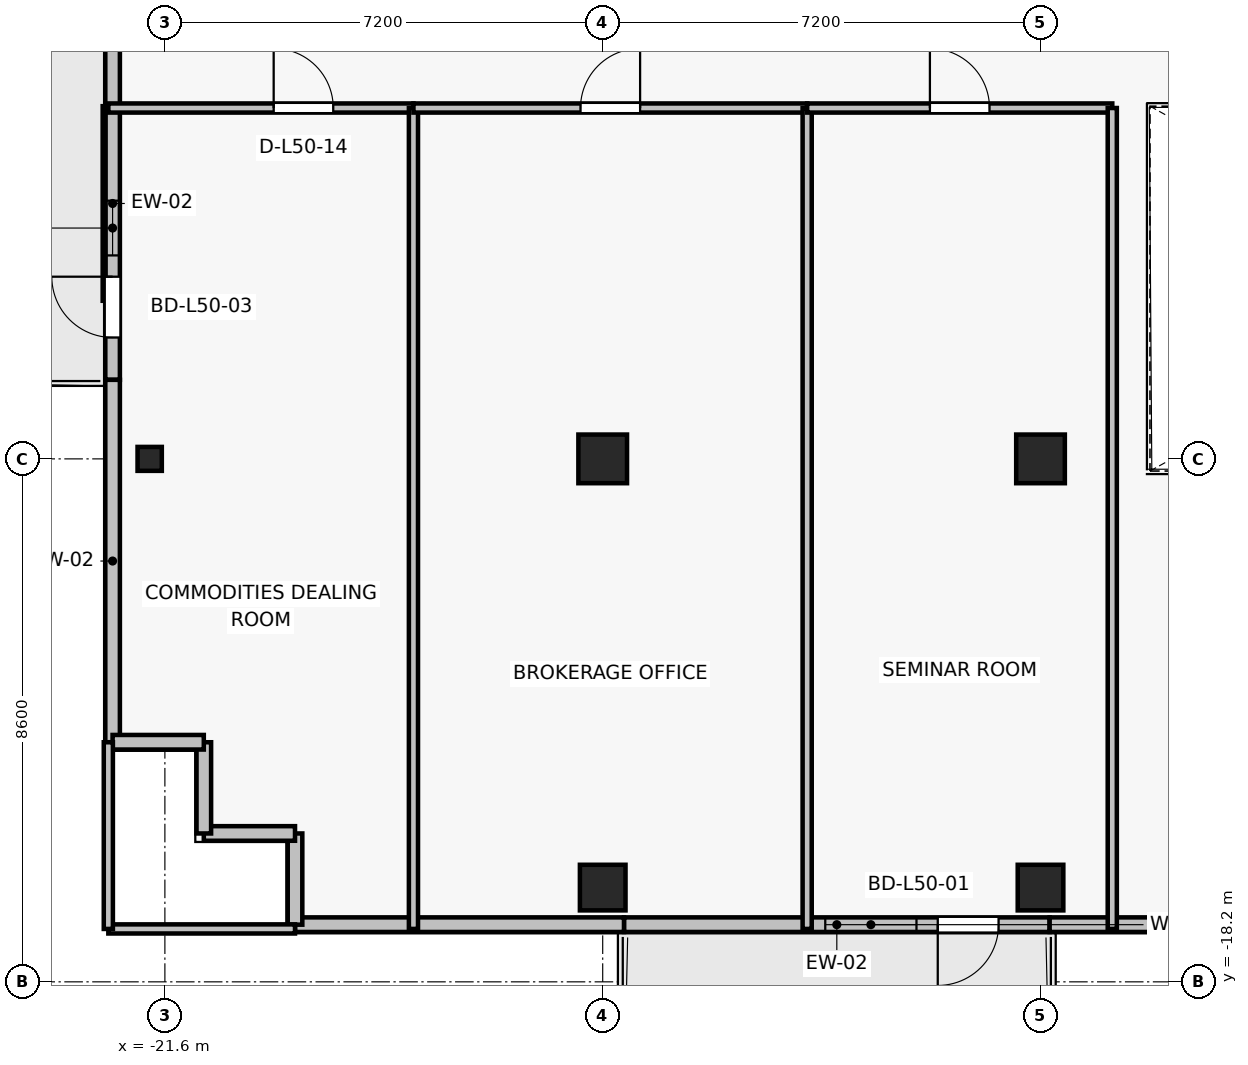
"""IFC4 building model, lengths in metres.
Left out: names, types, materials, properties, quantities, classifications, styles, units other than length and angle.
Written with IfcOpenShell. Run it as: python <this file> out.ifc"""

import sys

from ifc_helpers import new_model, si_unit, direction, frame, frame_2d, origin, origin_2d, place, context, subcontext, project, spatial, rectangle, i_section, extrude, source, transform, mapped, element, fill, save


model = new_model("IFC4")
c1 = context("Model", 3, precision=1e-05, world=origin(), true_north=direction((0.0, 1.0)))
c2 = subcontext(c1, "Body", "Model", "MODEL_VIEW")
j1 = project(units=[si_unit("LENGTHUNIT", "METRE"), si_unit("PLANEANGLEUNIT", "RADIAN")], contexts=[c1])
p1 = place(None, origin())
s1 = spatial("IfcSite", under=j1, at=p1, CompositionType="ELEMENT")
p2 = place(p1, origin())
s2 = spatial("IfcBuilding", under=s1, at=p2, CompositionType="ELEMENT")
p3 = place(p2, frame((0.0, 0.0, 179.2)))
s3 = spatial("IfcBuildingStorey", under=s2, at=p3, CompositionType="ELEMENT", Elevation=179.2)
for number, where, z_axis, x_axis in (
    (1, (-14.4, -9.6, 0.0), (0.0, 0.0, 1.0), (1.0, 0.0, 0.0)),
    (2, (-7.2, -9.6, 0.0), (0.0, 0.0, 1.0), (1.0, 0.0, 0.0)),
):
    element("IfcColumn", number, at=place(p3, frame(where, z_axis=z_axis, x_axis=x_axis)), inside=s3, PredefinedType="COLUMN", context=c2, shape_type="SweptSolid", body=[
        extrude(rectangle(XDim=0.8, YDim=0.8, at=origin_2d()), origin(), (0.0, 0.0, 1.0), 3.3),
    ])
for number, where, z_axis, x_axis in (
    (3, (-14.4, -16.65, 0.0), (0.0, 0.0, 1.0), (1.0, 0.0, 0.0)),
    (4, (-7.2, -16.65, 0.0), (0.0, 0.0, 1.0), (1.0, 0.0, 0.0)),
):
    element("IfcColumn", number, at=place(p3, frame(where, z_axis=z_axis, x_axis=x_axis)), inside=s3, PredefinedType="COLUMN", context=c2, shape_type="SweptSolid", body=[
        extrude(rectangle(XDim=0.75, YDim=0.75, at=origin_2d()), origin(), (0.0, 0.0, 1.0), 3.3),
    ])
p4 = place(p3, frame((-21.85, -9.6, 0.0), z_axis=(0.0, 0.0, 1.0), x_axis=(1.0, 0.0, 0.0)))
e5 = element("IfcColumn", 5, at=p4, inside=s3, PredefinedType="COLUMN", context=c2, shape_type="SweptSolid", body=[
    extrude(i_section(OverallWidth=0.399, OverallDepth=0.394, WebThickness=0.023, FlangeThickness=0.037, FilletRadius=0.015, at=origin_2d()), origin(), (0.0, 0.0, 1.0), 3.3),
])
p5 = place(p3, frame((-7.05, -17.26, 0.0), z_axis=(0.0, 0.0, 1.0), x_axis=(-1.0, 0.0, 0.0)))
e6 = element("IfcWall", 6, at=p5, inside=s3, PredefinedType="SOLIDWALL", context=c2, shape_type="SweptSolid", body=[
    extrude(rectangle(XDim=7.0, YDim=0.24, at=frame_2d((3.5, 0.0))), origin(), (0.0, 0.0, 1.0), 2.665),
])
p6 = place(p5, frame((0.84, 0.0, 0.0)))
e7 = element("IfcOpeningElement", 7, at=p6, cuts=e6, PredefinedType="OPENING", context=c2, shape_type="SweptSolid", body=[
    extrude(rectangle(XDim=1.0, YDim=2.2, at=frame_2d((0.5, 1.1))), frame((0.0, 0.13, 0.0), z_axis=(0.0, -1.0, 0.0), x_axis=(1.0, 0.0, 0.0)), (0.0, 0.0, 1.0), 0.26),
])
p7 = place(p5, frame((2.19, 0.0, 0.85)))
e8 = element("IfcOpeningElement", 8, at=p7, cuts=e6, PredefinedType="OPENING", context=c2, shape_type="SweptSolid", body=[
    extrude(rectangle(XDim=1.5, YDim=1.6, at=frame_2d((0.75, 0.8))), frame((0.0, 0.13, 0.0), z_axis=(0.0, -1.0, 0.0), x_axis=(1.0, 0.0, 0.0)), (0.0, 0.0, 1.0), 0.26),
])
p8 = place(p3, frame((-22.46, -8.3, 0.0), z_axis=(0.0, 0.0, 1.0), x_axis=(0.0, 1.0, 0.0)))
e9 = element("IfcWall", 9, at=p8, inside=s3, PredefinedType="SOLIDWALL", context=c2, shape_type="SweptSolid", body=[
    extrude(rectangle(XDim=5.8, YDim=0.24, at=frame_2d((2.9, 0.0))), origin(), (0.0, 0.0, 1.0), 3.075),
])
p9 = place(p8, frame((0.696, 0.0, 0.0)))
e10 = element("IfcOpeningElement", 10, at=p9, cuts=e9, PredefinedType="OPENING", context=c2, shape_type="SweptSolid", body=[
    extrude(rectangle(XDim=1.0, YDim=2.2, at=frame_2d((0.5, 1.1))), frame((0.0, 0.13, 0.0), z_axis=(0.0, -1.0, 0.0), x_axis=(1.0, 0.0, 0.0)), (0.0, 0.0, 1.0), 0.26),
])
p10 = place(p8, frame((2.046, 0.0, 0.85)))
e11 = element("IfcOpeningElement", 11, at=p10, cuts=e9, PredefinedType="OPENING", context=c2, shape_type="SweptSolid", body=[
    extrude(rectangle(XDim=0.9, YDim=1.35, at=frame_2d((0.45, 0.675))), frame((0.0, 0.13, 0.0), z_axis=(0.0, -1.0, 0.0), x_axis=(1.0, 0.0, 0.0)), (0.0, 0.0, 1.0), 0.26),
])
p11 = place(p3, frame((-22.46, -8.3, 0.0), z_axis=(0.0, 0.0, 1.0), x_axis=(0.0, -1.0, 0.0)))
e12 = element("IfcWall", 12, at=p11, inside=s3, PredefinedType="SOLIDWALL", context=c2, shape_type="SweptSolid", body=[
    extrude(rectangle(XDim=5.96, YDim=0.24, at=frame_2d((2.98, 0.0))), origin(), (0.0, 0.0, 1.0), 3.075),
])
p12 = place(p3, frame((-7.05, -17.26, 0.0), z_axis=(0.0, 0.0, 1.0), x_axis=(1.0, 0.0, 0.0)))
e13 = element("IfcWall", 13, at=p12, inside=s3, PredefinedType="SOLIDWALL", context=c2, shape_type="SweptSolid", body=[
    extrude(rectangle(XDim=3.85, YDim=0.24, at=frame_2d((1.925, 0.0))), origin(), (0.0, 0.0, 1.0), 3.075),
])
p13 = place(p3, frame((-19.46, -17.26, 0.0), z_axis=(0.0, 0.0, 1.0), x_axis=(1.0, 0.0, 0.0)))
e14 = element("IfcWall", 14, at=p13, inside=s3, PredefinedType="SOLIDWALL", context=c2, shape_type="SweptSolid", body=[
    extrude(rectangle(XDim=5.41, YDim=0.24, at=frame_2d((2.705, 0.0))), origin(), (0.0, 0.0, 1.0), 3.075),
])
for number, where, z_axis, x_axis in (
    (15, (-19.46, -15.76, 0.0), (0.0, 0.0, 1.0), (0.0, -1.0, 0.0)),
    (16, (-20.96, -15.76, 0.0), (0.0, 0.0, 1.0), (1.0, 0.0, 0.0)),
    (17, (-20.96, -14.26, 0.0), (0.0, 0.0, 1.0), (0.0, -1.0, 0.0)),
    (18, (-22.46, -14.26, 0.0), (0.0, 0.0, 1.0), (1.0, 0.0, 0.0)),
):
    element("IfcWall", number, at=place(p3, frame(where, z_axis=z_axis, x_axis=x_axis)), inside=s3, PredefinedType="SOLIDWALL", context=c2, shape_type="SweptSolid", body=[
        extrude(rectangle(XDim=1.5, YDim=0.24, at=frame_2d((0.75, 0.0))), origin(), (0.0, 0.0, 1.0), 3.075),
    ])
p14 = place(p3, frame((-19.46, -17.33, 0.0), z_axis=(0.0, 0.0, 1.0), x_axis=(-1.0, 0.0, 0.0)))
e19 = element("IfcWall", 19, at=p14, inside=s3, PredefinedType="PARTITIONING", context=c2, shape_type="SweptSolid", body=[
    extrude(rectangle(XDim=3.07, YDim=0.15, at=frame_2d((1.535, 0.0))), origin(), (0.0, 0.0, 1.0), 3.075),
])
p15 = place(p3, frame((-22.53, -3.83, 0.0), z_axis=(0.0, 0.0, 1.0), x_axis=(1.0, 0.0, 0.0)))
e20 = element("IfcWall", 20, at=p15, inside=s3, PredefinedType="PARTITIONING", context=c2, shape_type="SweptSolid", body=[
    extrude(rectangle(XDim=5.018, YDim=0.15, at=frame_2d((2.509, 0.0))), origin(), (0.0, 0.0, 1.0), 2.565),
])
p16 = place(p15, frame((2.719, 0.0, 0.0)))
e21 = element("IfcOpeningElement", 21, at=p16, cuts=e20, PredefinedType="OPENING", context=c2, shape_type="SweptSolid", body=[
    extrude(rectangle(XDim=0.98, YDim=2.15, at=frame_2d((0.49, 1.075))), frame((0.0, 0.085, 0.0), z_axis=(0.0, -1.0, 0.0), x_axis=(1.0, 0.0, 0.0)), (0.0, 0.0, 1.0), 0.17),
])
p17 = place(p3, frame((-22.53, -17.33, 0.0), z_axis=(0.0, 0.0, 1.0), x_axis=(0.0, 1.0, 0.0)))
e22 = element("IfcWall", 22, at=p17, inside=s3, PredefinedType="PARTITIONING", context=c2, shape_type="SweptSolid", body=[
    extrude(rectangle(XDim=3.07, YDim=0.15, at=frame_2d((1.535, 0.0))), origin(), (0.0, 0.0, 1.0), 3.075),
])
p18 = place(p3, frame((-17.512, -3.83, 0.0), z_axis=(0.0, 0.0, 1.0), x_axis=(0.0, -1.0, 0.0)))
e23 = element("IfcWall", 23, at=p18, inside=s3, PredefinedType="PARTITIONING", context=c2, shape_type="SweptSolid", body=[
    extrude(rectangle(XDim=13.5, YDim=0.15, at=frame_2d((6.75, 0.0))), origin(), (0.0, 0.0, 1.0), 2.565),
])
p19 = place(p3, frame((-17.512, -3.83, 0.0), z_axis=(0.0, 0.0, 1.0), x_axis=(1.0, 0.0, 0.0)))
e24 = element("IfcWall", 24, at=p19, inside=s3, PredefinedType="PARTITIONING", context=c2, shape_type="SweptSolid", body=[
    extrude(rectangle(XDim=6.475, YDim=0.15, at=frame_2d((3.237, 0.0))), origin(), (0.0, 0.0, 1.0), 2.565),
])
p20 = place(p19, frame((2.747, 0.0, 0.0)))
e25 = element("IfcOpeningElement", 25, at=p20, cuts=e24, PredefinedType="OPENING", context=c2, shape_type="SweptSolid", body=[
    extrude(rectangle(XDim=0.98, YDim=2.15, at=frame_2d((0.49, 1.075))), frame((0.0, 0.085, 0.0), z_axis=(0.0, -1.0, 0.0), x_axis=(1.0, 0.0, 0.0)), (0.0, 0.0, 1.0), 0.17),
])
p21 = place(p3, frame((-11.038, -3.83, 0.0), z_axis=(0.0, 0.0, 1.0), x_axis=(0.0, -1.0, 0.0)))
e26 = element("IfcWall", 26, at=p21, inside=s3, PredefinedType="PARTITIONING", context=c2, shape_type="SweptSolid", body=[
    extrude(rectangle(XDim=13.5, YDim=0.15, at=frame_2d((6.75, 0.0))), origin(), (0.0, 0.0, 1.0), 2.565),
])
p22 = place(p3, frame((-11.038, -3.83, 0.0), z_axis=(0.0, 0.0, 1.0), x_axis=(1.0, 0.0, 0.0)))
e27 = element("IfcWall", 27, at=p22, inside=s3, PredefinedType="PARTITIONING", context=c2, shape_type="SweptSolid", body=[
    extrude(rectangle(XDim=5.018, YDim=0.15, at=frame_2d((2.509, 0.0))), origin(), (0.0, 0.0, 1.0), 2.565),
])
p23 = place(p22, frame((2.019, 0.0, 0.0)))
e28 = element("IfcOpeningElement", 28, at=p23, cuts=e27, PredefinedType="OPENING", context=c2, shape_type="SweptSolid", body=[
    extrude(rectangle(XDim=0.98, YDim=2.15, at=frame_2d((0.49, 1.075))), frame((0.0, 0.085, 0.0), z_axis=(0.0, -1.0, 0.0), x_axis=(1.0, 0.0, 0.0)), (0.0, 0.0, 1.0), 0.17),
])
p24 = place(p3, frame((-6.02, -3.83, 0.0), z_axis=(0.0, 0.0, 1.0), x_axis=(0.0, -1.0, 0.0)))
e29 = element("IfcWall", 29, at=p24, inside=s3, PredefinedType="PARTITIONING", context=c2, shape_type="SweptSolid", body=[
    extrude(rectangle(XDim=13.5, YDim=0.15, at=frame_2d((6.75, 0.0))), origin(), (0.0, 0.0, 1.0), 2.565),
])
m1 = source(origin(), c2, "Body", "SweptSolid", [
    extrude(rectangle(XDim=1.0, YDim=2.2, at=frame_2d((0.5, 1.1))), frame((0.0, 0.025, 0.0), z_axis=(0.0, -1.0, 0.0), x_axis=(1.0, 0.0, 0.0)), (0.0, 0.0, 1.0), 0.05),
])
p25 = place(p6, origin())
e30 = element("IfcDoor", 30, at=p25, inside=s3, OperationType="SINGLE_SWING_RIGHT", PredefinedType="DOOR", context=c2, shape_type="MappedRepresentation", body=[
    mapped(m1, transform((0.0, 0.0, 0.0), x_axis=(1.0, 0.0, 0.0), y_axis=(0.0, 1.0, 0.0), z_axis=(0.0, 0.0, 1.0), scale=1.0)),
])
fill(e7, e30)
m2 = source(origin(), c2, "Body", "SweptSolid", [
    extrude(rectangle(XDim=1.5, YDim=1.6, at=frame_2d((0.75, 0.8))), frame((0.0, 0.03, 0.0), z_axis=(0.0, -1.0, 0.0), x_axis=(1.0, 0.0, 0.0)), (0.0, 0.0, 1.0), 0.06),
])
p26 = place(p7, origin())
e31 = element("IfcWindow", 31, at=p26, inside=s3, PartitioningType="SINGLE_PANEL", PredefinedType="WINDOW", context=c2, shape_type="MappedRepresentation", body=[
    mapped(m2, transform((0.0, 0.0, 0.0), x_axis=(1.0, 0.0, 0.0), y_axis=(0.0, 1.0, 0.0), z_axis=(0.0, 0.0, 1.0), scale=1.0)),
])
fill(e8, e31)
p27 = place(p9, origin())
e32 = element("IfcDoor", 32, at=p27, inside=s3, OperationType="SINGLE_SWING_RIGHT", PredefinedType="DOOR", context=c2, shape_type="MappedRepresentation", body=[
    mapped(m1, transform((0.0, 0.0, 0.0), x_axis=(1.0, 0.0, 0.0), y_axis=(0.0, 1.0, 0.0), z_axis=(0.0, 0.0, 1.0), scale=1.0)),
])
fill(e10, e32)
m3 = source(origin(), c2, "Body", "SweptSolid", [
    extrude(rectangle(XDim=0.9, YDim=1.35, at=frame_2d((0.45, 0.675))), frame((0.0, 0.03, 0.0), z_axis=(0.0, -1.0, 0.0), x_axis=(1.0, 0.0, 0.0)), (0.0, 0.0, 1.0), 0.06),
])
p28 = place(p10, origin())
e33 = element("IfcWindow", 33, at=p28, inside=s3, PartitioningType="SINGLE_PANEL", PredefinedType="WINDOW", context=c2, shape_type="MappedRepresentation", body=[
    mapped(m3, transform((0.0, 0.0, 0.0), x_axis=(1.0, 0.0, 0.0), y_axis=(0.0, 1.0, 0.0), z_axis=(0.0, 0.0, 1.0), scale=1.0)),
])
fill(e11, e33)
m4 = source(origin(), c2, "Body", "SweptSolid", [
    extrude(rectangle(XDim=0.98, YDim=2.15, at=frame_2d((0.49, 1.075))), frame((0.0, 0.025, 0.0), z_axis=(0.0, -1.0, 0.0), x_axis=(1.0, 0.0, 0.0)), (0.0, 0.0, 1.0), 0.05),
])
p29 = place(p16, origin())
e34 = element("IfcDoor", 34, at=p29, inside=s3, OperationType="SINGLE_SWING_LEFT", PredefinedType="DOOR", context=c2, shape_type="MappedRepresentation", body=[
    mapped(m4, transform((0.0, 0.0, 0.0), x_axis=(1.0, 0.0, 0.0), y_axis=(0.0, 1.0, 0.0), z_axis=(0.0, 0.0, 1.0), scale=1.0)),
])
fill(e21, e34)
p30 = place(p20, origin())
e35 = element("IfcDoor", 35, at=p30, inside=s3, OperationType="SINGLE_SWING_RIGHT", PredefinedType="DOOR", context=c2, shape_type="MappedRepresentation", body=[
    mapped(m4, transform((0.0, 0.0, 0.0), x_axis=(1.0, 0.0, 0.0), y_axis=(0.0, 1.0, 0.0), z_axis=(0.0, 0.0, 1.0), scale=1.0)),
])
fill(e25, e35)
p31 = place(p23, origin())
e36 = element("IfcDoor", 36, at=p31, inside=s3, OperationType="SINGLE_SWING_LEFT", PredefinedType="DOOR", context=c2, shape_type="MappedRepresentation", body=[
    mapped(m4, transform((0.0, 0.0, 0.0), x_axis=(1.0, 0.0, 0.0), y_axis=(0.0, 1.0, 0.0), z_axis=(0.0, 0.0, 1.0), scale=1.0)),
])
fill(e28, e36)
save(model, sys.argv[1])
